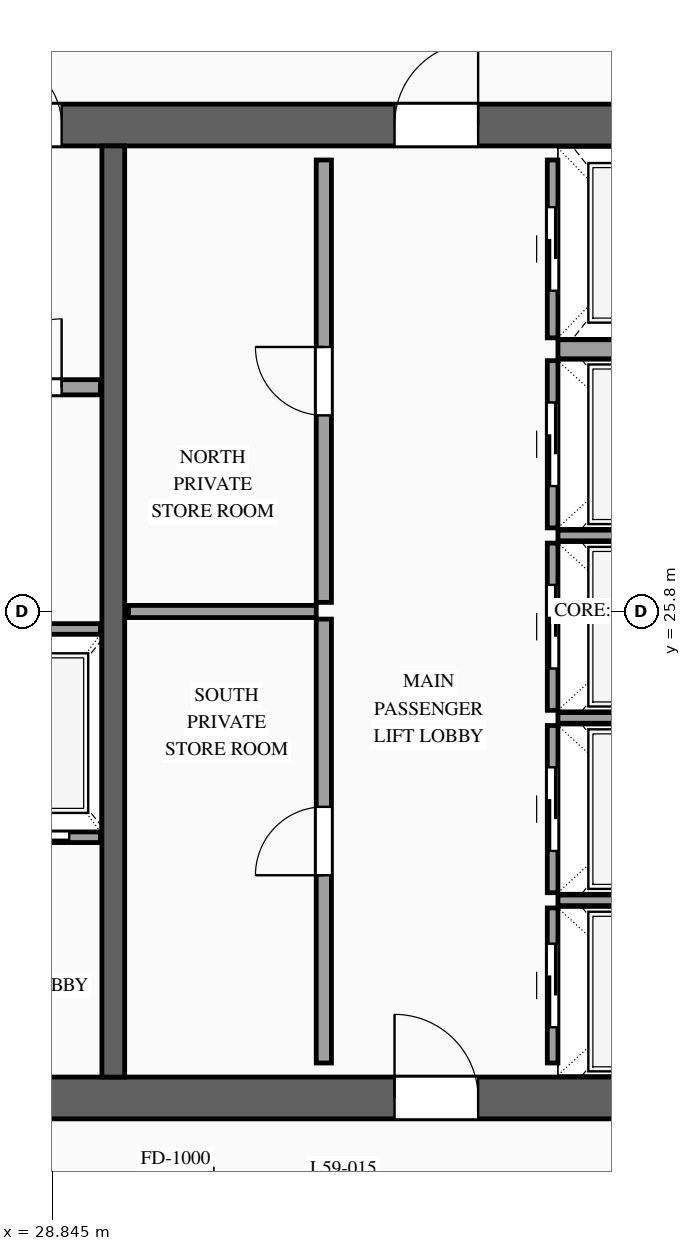
"""IFC4 building model, lengths in metres.
Left out: names, types, materials, properties, quantities, classifications, styles, units other than length and angle.
Written with IfcOpenShell. Run it as: python <this file> out.ifc"""

import sys

from ifc_helpers import new_model, si_unit, direction, frame, frame_2d, origin, place, context, subcontext, project, spatial, rectangle, extrude, source, transform, mapped, element, fill, save


model = new_model("IFC4")
c1 = context("Model", 3, precision=1e-05, world=origin(), true_north=direction((0.0, 1.0)))
c2 = subcontext(c1, "Body", "Model", "MODEL_VIEW")
j1 = project(units=[si_unit("LENGTHUNIT", "METRE"), si_unit("PLANEANGLEUNIT", "RADIAN")], contexts=[c1])
p1 = place(None, origin())
s1 = spatial("IfcSite", under=j1, at=p1, CompositionType="ELEMENT")
p2 = place(p1, origin())
s2 = spatial("IfcBuilding", under=s1, at=p2, CompositionType="ELEMENT")
p3 = place(p2, frame((0.0, 0.0, 224.1)))
s3 = spatial("IfcBuildingStorey", under=s2, at=p3, CompositionType="ELEMENT", Elevation=224.1)
p4 = place(p3, frame((23.525, 19.4, 0.0), z_axis=(0.0, 0.0, 1.0), x_axis=(1.0, 0.0, 0.0)))
e1 = element("IfcWall", 1, at=p4, inside=s3, PredefinedType="SHEAR", context=c2, shape_type="SweptSolid", body=[
    extrude(rectangle(XDim=26.95, YDim=0.55, at=frame_2d((13.475, 0.0))), origin(), (0.0, 0.0, 1.0), 3.5),
])
p5 = place(p4, frame((1.925, 0.0, 0.0)))
e2 = element("IfcOpeningElement", 2, at=p5, cuts=e1, PredefinedType="OPENING", context=c2, shape_type="SweptSolid", body=[
    extrude(rectangle(XDim=1.1, YDim=2.2, at=frame_2d((0.55, 1.1))), frame((0.0, 0.29, 0.0), z_axis=(0.0, -1.0, 0.0), x_axis=(1.0, 0.0, 0.0)), (0.0, 0.0, 1.0), 0.58),
])
p6 = place(p4, frame((9.825, 0.0, 0.0)))
e3 = element("IfcOpeningElement", 3, at=p6, cuts=e1, PredefinedType="OPENING", context=c2, shape_type="SweptSolid", body=[
    extrude(rectangle(XDim=1.1, YDim=2.2, at=frame_2d((0.55, 1.1))), frame((0.0, 0.29, 0.0), z_axis=(0.0, -1.0, 0.0), x_axis=(1.0, 0.0, 0.0)), (0.0, 0.0, 1.0), 0.58),
])
p7 = place(p4, frame((23.025, 0.0, 0.0)))
e4 = element("IfcOpeningElement", 4, at=p7, cuts=e1, PredefinedType="OPENING", context=c2, shape_type="SweptSolid", body=[
    extrude(rectangle(XDim=1.1, YDim=2.2, at=frame_2d((0.55, 1.1))), frame((0.0, 0.29, 0.0), z_axis=(0.0, -1.0, 0.0), x_axis=(1.0, 0.0, 0.0)), (0.0, 0.0, 1.0), 0.58),
])
p8 = place(p4, frame((19.645, 0.0, 0.0)))
e5 = element("IfcOpeningElement", 5, at=p8, cuts=e1, PredefinedType="OPENING", context=c2, shape_type="SweptSolid", body=[
    extrude(rectangle(XDim=0.9, YDim=2.15, at=frame_2d((0.45, 1.075))), frame((0.0, 0.29, 0.0), z_axis=(0.0, -1.0, 0.0), x_axis=(1.0, 0.0, 0.0)), (0.0, 0.0, 1.0), 0.58),
])
p9 = place(p4, frame((18.205, 0.0, 0.0)))
e6 = element("IfcOpeningElement", 6, at=p9, cuts=e1, PredefinedType="OPENING", context=c2, shape_type="SweptSolid", body=[
    extrude(rectangle(XDim=0.9, YDim=2.15, at=frame_2d((0.45, 1.075))), frame((0.0, 0.29, 0.0), z_axis=(0.0, -1.0, 0.0), x_axis=(1.0, 0.0, 0.0)), (0.0, 0.0, 1.0), 0.58),
])
p10 = place(p3, frame((23.525, 32.2, 0.0), z_axis=(0.0, 0.0, 1.0), x_axis=(1.0, 0.0, 0.0)))
e7 = element("IfcWall", 7, at=p10, inside=s3, PredefinedType="SHEAR", context=c2, shape_type="SweptSolid", body=[
    extrude(rectangle(XDim=26.95, YDim=0.55, at=frame_2d((13.475, 0.0))), origin(), (0.0, 0.0, 1.0), 3.5),
])
p11 = place(p10, frame((4.545, 0.0, 0.0)))
e8 = element("IfcOpeningElement", 8, at=p11, cuts=e7, PredefinedType="OPENING", context=c2, shape_type="SweptSolid", body=[
    extrude(rectangle(XDim=0.9, YDim=2.15, at=frame_2d((0.45, 1.075))), frame((0.0, 0.29, 0.0), z_axis=(0.0, -1.0, 0.0), x_axis=(1.0, 0.0, 0.0)), (0.0, 0.0, 1.0), 0.58),
])
p12 = place(p10, frame((9.825, 0.0, 0.0)))
e9 = element("IfcOpeningElement", 9, at=p12, cuts=e7, PredefinedType="OPENING", context=c2, shape_type="SweptSolid", body=[
    extrude(rectangle(XDim=1.1, YDim=2.2, at=frame_2d((0.55, 1.1))), frame((0.0, 0.29, 0.0), z_axis=(0.0, -1.0, 0.0), x_axis=(1.0, 0.0, 0.0)), (0.0, 0.0, 1.0), 0.58),
])
p13 = place(p10, frame((15.675, 0.0, 0.0)))
e10 = element("IfcOpeningElement", 10, at=p13, cuts=e7, PredefinedType="OPENING", context=c2, shape_type="SweptSolid", body=[
    extrude(rectangle(XDim=1.1, YDim=2.2, at=frame_2d((0.55, 1.1))), frame((0.0, 0.29, 0.0), z_axis=(0.0, -1.0, 0.0), x_axis=(1.0, 0.0, 0.0)), (0.0, 0.0, 1.0), 0.58),
])
p14 = place(p10, frame((19.645, 0.0, 0.0)))
e11 = element("IfcOpeningElement", 11, at=p14, cuts=e7, PredefinedType="OPENING", context=c2, shape_type="SweptSolid", body=[
    extrude(rectangle(XDim=0.9, YDim=2.15, at=frame_2d((0.45, 1.075))), frame((0.0, 0.29, 0.0), z_axis=(0.0, -1.0, 0.0), x_axis=(1.0, 0.0, 0.0)), (0.0, 0.0, 1.0), 0.58),
])
m1 = source(origin(), c2, "Body", "SweptSolid", [
    extrude(rectangle(XDim=12.25, YDim=0.3, at=frame_2d((6.125, 0.0))), origin(), (0.0, 0.0, 1.0), 3.5),
])
p15 = place(p3, frame((29.65, 19.675, 0.0), z_axis=(0.0, 0.0, 1.0), x_axis=(0.0, 1.0, 0.0)))
e12 = element("IfcWall", 12, at=p15, inside=s3, PredefinedType="SOLIDWALL", context=c2, shape_type="MappedRepresentation", body=[
    mapped(m1, transform((0.0, 0.0, 0.0), scale=1.0)),
])
p16 = place(p3, frame((27.56, 22.83, 0.0), z_axis=(0.0, 0.0, 1.0), x_axis=(1.0, 0.0, 0.0)))
e13 = element("IfcWall", 13, at=p16, inside=s3, PredefinedType="SOLIDWALL", context=c2, shape_type="SweptSolid", body=[
    extrude(rectangle(XDim=1.92, YDim=0.14, at=frame_2d((0.96, 0.0))), origin(), (0.0, 0.0, 1.0), 3.28),
])
p17 = place(p16, frame((0.41, 0.0, 0.0)))
e14 = element("IfcOpeningElement", 14, at=p17, cuts=e13, PredefinedType="OPENING", context=c2, shape_type="SweptSolid", body=[
    extrude(rectangle(XDim=1.1, YDim=2.2, at=frame_2d((0.55, 1.1))), frame((0.0, 0.085, 0.0), z_axis=(0.0, -1.0, 0.0), x_axis=(1.0, 0.0, 0.0)), (0.0, 0.0, 1.0), 0.17),
])
m2 = source(origin(), c2, "Body", "SweptSolid", [
    extrude(rectangle(XDim=1.92, YDim=0.14, at=frame_2d((0.96, 0.0))), origin(), (0.0, 0.0, 1.0), 3.28),
])
p18 = place(p3, frame((27.56, 25.57, 0.0), z_axis=(0.0, 0.0, 1.0), x_axis=(1.0, 0.0, 0.0)))
e15 = element("IfcWall", 15, at=p18, inside=s3, PredefinedType="SOLIDWALL", context=c2, shape_type="MappedRepresentation", body=[
    mapped(m2, transform((0.0, 0.0, 0.0), scale=1.0)),
])
p19 = place(p3, frame((35.43, 19.86, 0.0), z_axis=(0.0, 0.0, 1.0), x_axis=(0.0, 1.0, 0.0)))
e16 = element("IfcWall", 16, at=p19, inside=s3, PredefinedType="SOLIDWALL", context=c2, shape_type="SweptSolid", body=[
    extrude(rectangle(XDim=2.04, YDim=0.14, at=frame_2d((1.02, 0.0))), origin(), (0.0, 0.0, 1.0), 3.28),
])
p20 = place(p19, frame((0.47, 0.0, 0.0)))
e17 = element("IfcOpeningElement", 17, at=p20, cuts=e16, PredefinedType="OPENING", context=c2, shape_type="SweptSolid", body=[
    extrude(rectangle(XDim=1.1, YDim=2.2, at=frame_2d((0.55, 1.1))), frame((0.0, 0.085, 0.0), z_axis=(0.0, -1.0, 0.0), x_axis=(1.0, 0.0, 0.0)), (0.0, 0.0, 1.0), 0.17),
])
m3 = source(origin(), c2, "Body", "SweptSolid", [
    extrude(rectangle(XDim=2.4, YDim=0.14, at=frame_2d((1.2, 0.0))), origin(), (0.0, 0.0, 1.0), 3.28),
])
p21 = place(p3, frame((35.5, 22.0, 0.0), z_axis=(0.0, 0.0, 1.0), x_axis=(1.0, 0.0, 0.0)))
e18 = element("IfcWall", 18, at=p21, inside=s3, PredefinedType="SOLIDWALL", context=c2, shape_type="MappedRepresentation", body=[
    mapped(m3, transform((0.0, 0.0, 0.0), scale=1.0)),
])
p22 = place(p3, frame((35.43, 22.1, 0.0), z_axis=(0.0, 0.0, 1.0), x_axis=(0.0, 1.0, 0.0)))
e19 = element("IfcWall", 19, at=p22, inside=s3, PredefinedType="SOLIDWALL", context=c2, shape_type="SweptSolid", body=[
    extrude(rectangle(XDim=2.2, YDim=0.14, at=frame_2d((1.1, 0.0))), origin(), (0.0, 0.0, 1.0), 3.28),
])
p23 = place(p22, frame((0.55, 0.0, 0.0)))
e20 = element("IfcOpeningElement", 20, at=p23, cuts=e19, PredefinedType="OPENING", context=c2, shape_type="SweptSolid", body=[
    extrude(rectangle(XDim=1.1, YDim=2.2, at=frame_2d((0.55, 1.1))), frame((0.0, 0.085, 0.0), z_axis=(0.0, -1.0, 0.0), x_axis=(1.0, 0.0, 0.0)), (0.0, 0.0, 1.0), 0.17),
])
p24 = place(p3, frame((35.5, 24.4, 0.0), z_axis=(0.0, 0.0, 1.0), x_axis=(1.0, 0.0, 0.0)))
e21 = element("IfcWall", 21, at=p24, inside=s3, PredefinedType="SOLIDWALL", context=c2, shape_type="MappedRepresentation", body=[
    mapped(m3, transform((0.0, 0.0, 0.0), scale=1.0)),
])
p25 = place(p3, frame((35.43, 24.5, 0.0), z_axis=(0.0, 0.0, 1.0), x_axis=(0.0, 1.0, 0.0)))
e22 = element("IfcWall", 22, at=p25, inside=s3, PredefinedType="SOLIDWALL", context=c2, shape_type="SweptSolid", body=[
    extrude(rectangle(XDim=2.2, YDim=0.14, at=frame_2d((1.1, 0.0))), origin(), (0.0, 0.0, 1.0), 3.28),
])
p26 = place(p25, frame((0.55, 0.0, 0.0)))
e23 = element("IfcOpeningElement", 23, at=p26, cuts=e22, PredefinedType="OPENING", context=c2, shape_type="SweptSolid", body=[
    extrude(rectangle(XDim=1.1, YDim=2.2, at=frame_2d((0.55, 1.1))), frame((0.0, 0.085, 0.0), z_axis=(0.0, -1.0, 0.0), x_axis=(1.0, 0.0, 0.0)), (0.0, 0.0, 1.0), 0.17),
])
p27 = place(p3, frame((35.5, 26.8, 0.0), z_axis=(0.0, 0.0, 1.0), x_axis=(1.0, 0.0, 0.0)))
e24 = element("IfcWall", 24, at=p27, inside=s3, PredefinedType="SOLIDWALL", context=c2, shape_type="MappedRepresentation", body=[
    mapped(m3, transform((0.0, 0.0, 0.0), scale=1.0)),
])
p28 = place(p3, frame((35.43, 26.9, 0.0), z_axis=(0.0, 0.0, 1.0), x_axis=(0.0, 1.0, 0.0)))
e25 = element("IfcWall", 25, at=p28, inside=s3, PredefinedType="SOLIDWALL", context=c2, shape_type="SweptSolid", body=[
    extrude(rectangle(XDim=2.2, YDim=0.14, at=frame_2d((1.1, 0.0))), origin(), (0.0, 0.0, 1.0), 3.28),
])
p29 = place(p28, frame((0.55, 0.0, 0.0)))
e26 = element("IfcOpeningElement", 26, at=p29, cuts=e25, PredefinedType="OPENING", context=c2, shape_type="SweptSolid", body=[
    extrude(rectangle(XDim=1.1, YDim=2.2, at=frame_2d((0.55, 1.1))), frame((0.0, 0.085, 0.0), z_axis=(0.0, -1.0, 0.0), x_axis=(1.0, 0.0, 0.0)), (0.0, 0.0, 1.0), 0.17),
])
p30 = place(p3, frame((35.43, 29.4, 0.0), z_axis=(0.0, 0.0, 1.0), x_axis=(0.0, 1.0, 0.0)))
e27 = element("IfcWall", 27, at=p30, inside=s3, PredefinedType="SOLIDWALL", context=c2, shape_type="SweptSolid", body=[
    extrude(rectangle(XDim=2.34, YDim=0.14, at=frame_2d((1.17, 0.0))), origin(), (0.0, 0.0, 1.0), 3.28),
])
p31 = place(p30, frame((0.62, 0.0, 0.0)))
e28 = element("IfcOpeningElement", 28, at=p31, cuts=e27, PredefinedType="OPENING", context=c2, shape_type="SweptSolid", body=[
    extrude(rectangle(XDim=1.1, YDim=2.2, at=frame_2d((0.55, 1.1))), frame((0.0, 0.085, 0.0), z_axis=(0.0, -1.0, 0.0), x_axis=(1.0, 0.0, 0.0)), (0.0, 0.0, 1.0), 0.17),
])
m4 = source(origin(), c2, "Body", "SweptSolid", [
    extrude(rectangle(XDim=2.4, YDim=0.25, at=frame_2d((1.2, 0.0))), origin(), (0.0, 0.0, 1.0), 3.28),
])
p32 = place(p3, frame((35.5, 29.25, 0.0), z_axis=(0.0, 0.0, 1.0), x_axis=(1.0, 0.0, 0.0)))
e29 = element("IfcWall", 29, at=p32, inside=s3, PredefinedType="SOLIDWALL", context=c2, shape_type="MappedRepresentation", body=[
    mapped(m4, transform((0.0, 0.0, 0.0), scale=1.0)),
])
p33 = place(p3, frame((27.56, 28.75, 0.0), z_axis=(0.0, 0.0, 1.0), x_axis=(1.0, 0.0, 0.0)))
e30 = element("IfcWall", 30, at=p33, inside=s3, PredefinedType="PARTITIONING", context=c2, shape_type="SweptSolid", body=[
    extrude(rectangle(XDim=1.92, YDim=0.2, at=frame_2d((0.96, 0.0))), origin(), (0.0, 0.0, 1.0), 3.28),
])
p34 = place(p33, frame((0.51, 0.0, 0.0)))
e31 = element("IfcOpeningElement", 31, at=p34, cuts=e30, PredefinedType="OPENING", context=c2, shape_type="SweptSolid", body=[
    extrude(rectangle(XDim=0.9, YDim=2.15, at=frame_2d((0.45, 1.075))), frame((0.0, 0.115, 0.0), z_axis=(0.0, -1.0, 0.0), x_axis=(1.0, 0.0, 0.0)), (0.0, 0.0, 1.0), 0.23),
])
p35 = place(p3, frame((32.42, 19.86, 0.0), z_axis=(0.0, 0.0, 1.0), x_axis=(0.0, 1.0, 0.0)))
e32 = element("IfcWall", 32, at=p35, inside=s3, PredefinedType="PARTITIONING", context=c2, shape_type="SweptSolid", body=[
    extrude(rectangle(XDim=5.84, YDim=0.2, at=frame_2d((2.92, 0.0))), origin(), (0.0, 0.0, 1.0), 3.28),
])
p36 = place(p35, frame((2.47, 0.0, 0.0)))
e33 = element("IfcOpeningElement", 33, at=p36, cuts=e32, PredefinedType="OPENING", context=c2, shape_type="SweptSolid", body=[
    extrude(rectangle(XDim=0.9, YDim=2.15, at=frame_2d((0.45, 1.075))), frame((0.0, 0.115, 0.0), z_axis=(0.0, -1.0, 0.0), x_axis=(1.0, 0.0, 0.0)), (0.0, 0.0, 1.0), 0.23),
])
p37 = place(p3, frame((32.42, 25.92, 0.0), z_axis=(0.0, 0.0, 1.0), x_axis=(0.0, 1.0, 0.0)))
e34 = element("IfcWall", 34, at=p37, inside=s3, PredefinedType="PARTITIONING", context=c2, shape_type="SweptSolid", body=[
    extrude(rectangle(XDim=5.82, YDim=0.2, at=frame_2d((2.91, 0.0))), origin(), (0.0, 0.0, 1.0), 3.28),
])
p38 = place(p37, frame((2.46, 0.0, 0.0)))
e35 = element("IfcOpeningElement", 35, at=p38, cuts=e34, PredefinedType="OPENING", context=c2, shape_type="SweptSolid", body=[
    extrude(rectangle(XDim=0.9, YDim=2.15, at=frame_2d((0.45, 1.075))), frame((0.0, 0.115, 0.0), z_axis=(0.0, -1.0, 0.0), x_axis=(1.0, 0.0, 0.0)), (0.0, 0.0, 1.0), 0.23),
])
m5 = source(origin(), c2, "Body", "SweptSolid", [
    extrude(rectangle(XDim=2.47, YDim=0.16, at=frame_2d((1.235, 0.0))), origin(), (0.0, 0.0, 1.0), 3.28),
])
p39 = place(p3, frame((29.85, 25.8, 0.0), z_axis=(0.0, 0.0, 1.0), x_axis=(1.0, 0.0, 0.0)))
e36 = element("IfcWall", 36, at=p39, inside=s3, PredefinedType="PARTITIONING", context=c2, shape_type="MappedRepresentation", body=[
    mapped(m5, transform((0.0, 0.0, 0.0), scale=1.0)),
])
m6 = source(origin(), c2, "Body", "SweptSolid", [
    extrude(rectangle(XDim=1.1, YDim=2.2, at=frame_2d((0.55, 1.1))), frame((0.0, 0.025, 0.0), z_axis=(0.0, -1.0, 0.0), x_axis=(1.0, 0.0, 0.0)), (0.0, 0.0, 1.0), 0.05),
])
p40 = place(p17, origin())
e37 = element("IfcDoor", 37, at=p40, inside=s3, OperationType="SLIDING_TO_LEFT", PredefinedType="DOOR", context=c2, shape_type="MappedRepresentation", body=[
    mapped(m6, transform((0.0, 0.0, 0.0), scale=1.0)),
])
fill(e14, e37)
p41 = place(p20, origin())
e38 = element("IfcDoor", 38, at=p41, inside=s3, OperationType="SLIDING_TO_RIGHT", PredefinedType="DOOR", context=c2, shape_type="MappedRepresentation", body=[
    mapped(m6, transform((0.0, 0.0, 0.0), scale=1.0)),
])
fill(e17, e38)
p42 = place(p23, origin())
e39 = element("IfcDoor", 39, at=p42, inside=s3, OperationType="SLIDING_TO_LEFT", PredefinedType="DOOR", context=c2, shape_type="MappedRepresentation", body=[
    mapped(m6, transform((0.0, 0.0, 0.0), scale=1.0)),
])
fill(e20, e39)
p43 = place(p26, origin())
e40 = element("IfcDoor", 40, at=p43, inside=s3, OperationType="SLIDING_TO_RIGHT", PredefinedType="DOOR", context=c2, shape_type="MappedRepresentation", body=[
    mapped(m6, transform((0.0, 0.0, 0.0), scale=1.0)),
])
fill(e23, e40)
p44 = place(p29, origin())
e41 = element("IfcDoor", 41, at=p44, inside=s3, OperationType="SLIDING_TO_LEFT", PredefinedType="DOOR", context=c2, shape_type="MappedRepresentation", body=[
    mapped(m6, transform((0.0, 0.0, 0.0), scale=1.0)),
])
fill(e26, e41)
p45 = place(p31, origin())
e42 = element("IfcDoor", 42, at=p45, inside=s3, OperationType="SLIDING_TO_RIGHT", PredefinedType="DOOR", context=c2, shape_type="MappedRepresentation", body=[
    mapped(m6, transform((0.0, 0.0, 0.0), scale=1.0)),
])
fill(e28, e42)
m7 = source(origin(), c2, "Body", "SweptSolid", [
    extrude(rectangle(XDim=1.1, YDim=2.2, at=frame_2d((0.55, 1.1))), frame((0.0, 0.025, 0.0), z_axis=(0.0, -1.0, 0.0), x_axis=(1.0, 0.0, 0.0)), (0.0, 0.0, 1.0), 0.05),
])
p46 = place(p6, origin())
e43 = element("IfcDoor", 43, at=p46, inside=s3, OperationType="SINGLE_SWING_LEFT", PredefinedType="DOOR", context=c2, shape_type="MappedRepresentation", body=[
    mapped(m7, transform((0.0, 0.0, 0.0), scale=1.0)),
])
fill(e3, e43)
m8 = source(origin(), c2, "Body", "SweptSolid", [
    extrude(rectangle(XDim=0.9, YDim=2.15, at=frame_2d((0.45, 1.075))), frame((0.0, 0.025, 0.0), z_axis=(0.0, -1.0, 0.0), x_axis=(1.0, 0.0, 0.0)), (0.0, 0.0, 1.0), 0.05),
])
p47 = place(p11, origin())
e44 = element("IfcDoor", 44, at=p47, inside=s3, OperationType="SINGLE_SWING_LEFT", PredefinedType="DOOR", context=c2, shape_type="MappedRepresentation", body=[
    mapped(m8, transform((0.0, 0.0, 0.0), scale=1.0)),
])
fill(e8, e44)
p48 = place(p12, origin())
e45 = element("IfcDoor", 45, at=p48, inside=s3, OperationType="SINGLE_SWING_RIGHT", PredefinedType="DOOR", context=c2, shape_type="MappedRepresentation", body=[
    mapped(m7, transform((0.0, 0.0, 0.0), scale=1.0)),
])
fill(e9, e45)
p49 = place(p34, origin())
e46 = element("IfcDoor", 46, at=p49, inside=s3, OperationType="SINGLE_SWING_RIGHT", PredefinedType="DOOR", context=c2, shape_type="MappedRepresentation", body=[
    mapped(m8, transform((0.0, 0.0, 0.0), scale=1.0)),
])
fill(e31, e46)
p50 = place(p36, origin())
e47 = element("IfcDoor", 47, at=p50, inside=s3, OperationType="SINGLE_SWING_LEFT", PredefinedType="DOOR", context=c2, shape_type="MappedRepresentation", body=[
    mapped(m8, transform((0.0, 0.0, 0.0), scale=1.0)),
])
fill(e33, e47)
p51 = place(p38, origin())
e48 = element("IfcDoor", 48, at=p51, inside=s3, OperationType="SINGLE_SWING_RIGHT", PredefinedType="DOOR", context=c2, shape_type="MappedRepresentation", body=[
    mapped(m8, transform((0.0, 0.0, 0.0), scale=1.0)),
])
fill(e35, e48)
save(model, sys.argv[1])
